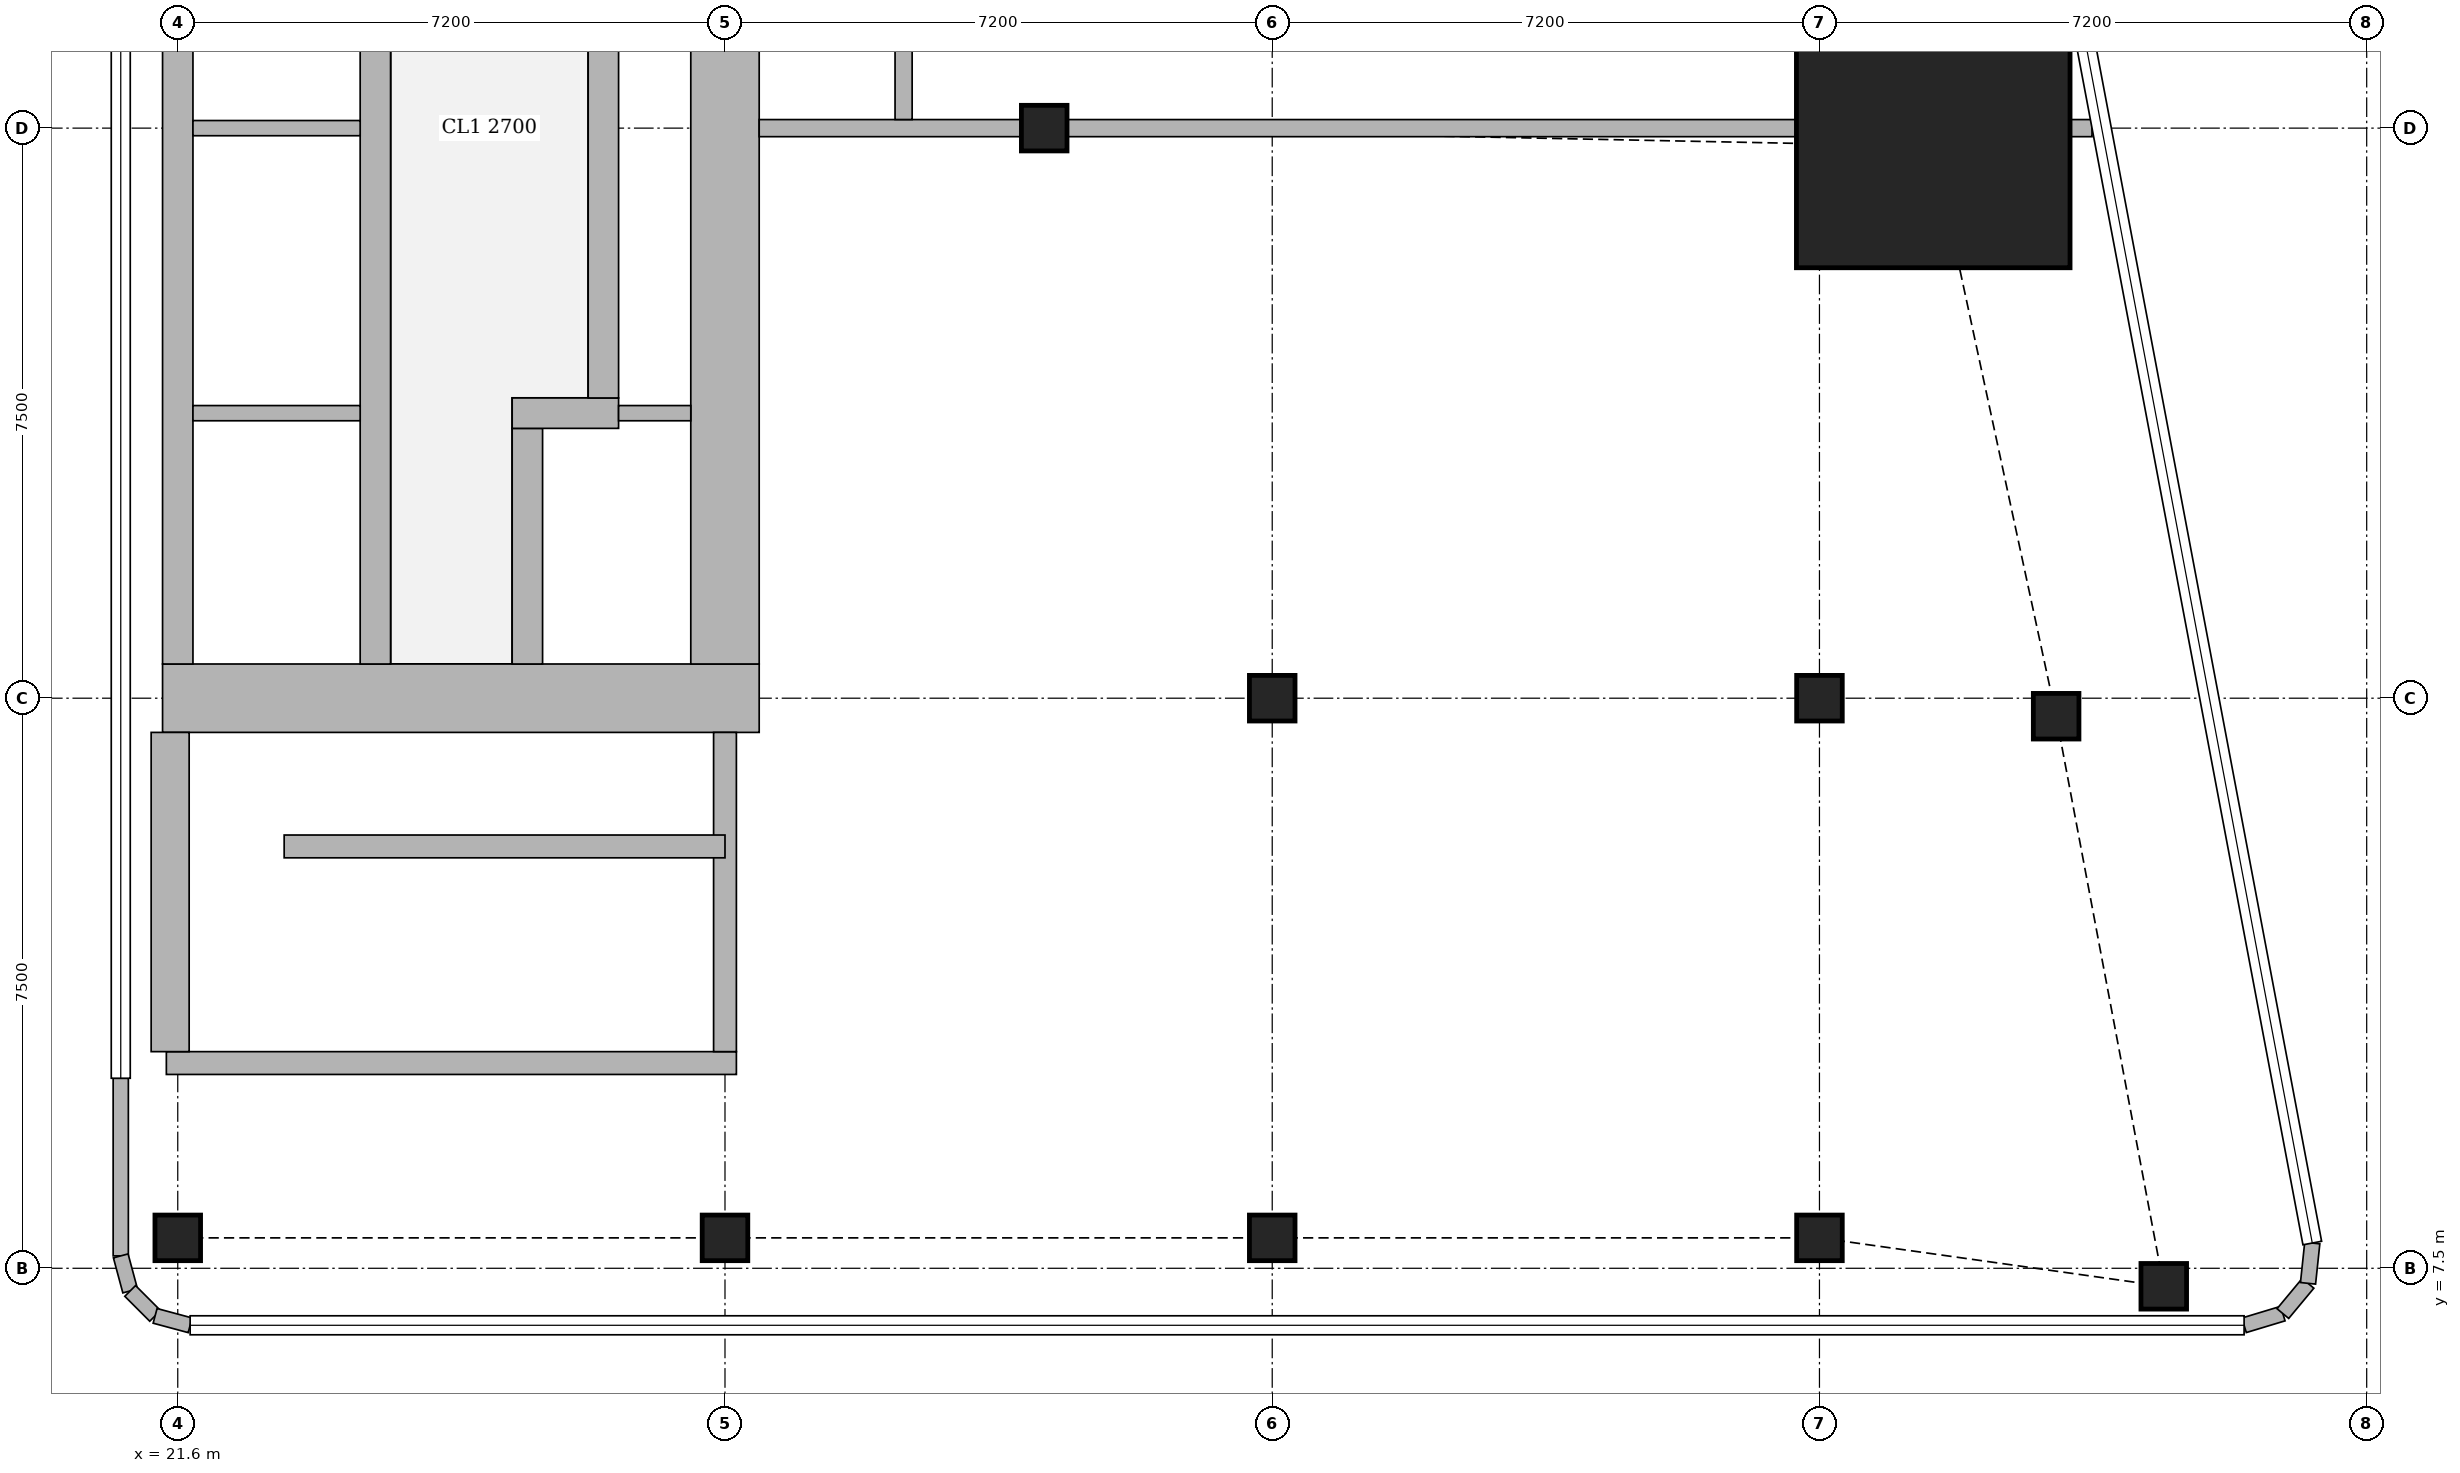
"""IFC4 building model, lengths in metres.
Left out: names, types, materials, properties, quantities, classifications, styles, units other than length and angle.
Written with IfcOpenShell. Run it as: python <this file> out.ifc"""

import sys

from ifc_helpers import new_model, si_unit, direction, frame, frame_2d, origin, origin_2d, place, context, subcontext, project, spatial, rectangle, extrude, element, fill, save


model = new_model("IFC4")
c1 = context("Model", 3, precision=1e-05, world=origin(), true_north=direction((0.0, 1.0)))
c2 = subcontext(c1, "Body", "Model", "MODEL_VIEW")
j1 = project(units=[si_unit("LENGTHUNIT", "METRE"), si_unit("PLANEANGLEUNIT", "RADIAN")], contexts=[c1])
p1 = place(None, origin())
s1 = spatial("IfcSite", under=j1, at=p1, CompositionType="ELEMENT")
p2 = place(p1, origin())
s2 = spatial("IfcBuilding", under=s1, at=p2, CompositionType="ELEMENT")
p3 = place(p2, frame((0.0, 0.0, 296.6)))
s3 = spatial("IfcBuildingStorey", under=s2, at=p3, CompositionType="ELEMENT", Elevation=296.6)
for number, where, z_axis, x_axis in (
    (1, (21.6, 7.9, 0.0), (0.0, 0.0, 1.0), (1.0, 0.0, 0.0)),
    (2, (28.8, 7.9, 0.0), (0.0, 0.0, 1.0), (1.0, 0.0, 0.0)),
    (3, (36.0, 7.9, 0.0), (0.0, 0.0, 1.0), (1.0, 0.0, 0.0)),
    (4, (43.2, 7.9, 0.0), (0.0, 0.0, 1.0), (1.0, 0.0, 0.0)),
    (5, (47.73, 7.263, 0.0), (0.0, 0.0, 1.0), (1.0, 0.0, 0.0)),
    (6, (36.0, 15.0, 0.0), (0.0, 0.0, 1.0), (1.0, 0.0, 0.0)),
    (7, (43.2, 15.0, 0.0), (0.0, 0.0, 1.0), (1.0, 0.0, 0.0)),
    (8, (46.314, 14.763, 0.0), (0.0, 0.0, 1.0), (1.0, 0.0, 0.0)),
    (9, (33.0, 22.5, 0.0), (0.0, 0.0, 1.0), (1.0, 0.0, 0.0)),
):
    element("IfcColumn", number, at=place(p3, frame(where, z_axis=z_axis, x_axis=x_axis)), inside=s3, PredefinedType="COLUMN", context=c2, shape_type="SweptSolid", body=[
        extrude(rectangle(XDim=0.6, YDim=0.6, at=origin_2d()), origin(), (0.0, 0.0, 1.0), 5.0),
    ])
p4 = place(p3, frame((44.697, 22.263, 0.0), z_axis=(0.0, 0.0, 1.0), x_axis=(1.0, 0.0, 0.0)))
e10 = element("IfcColumn", 10, at=p4, inside=s3, PredefinedType="COLUMN", context=c2, shape_type="SweptSolid", body=[
    extrude(rectangle(XDim=3.6, YDim=3.2, at=origin_2d()), origin(), (0.0, 0.0, 1.0), 5.0),
])
p5 = place(p3, frame((21.4, 15.0, 0.0), z_axis=(0.0, 0.0, 1.0), x_axis=(1.0, 0.0, 0.0)))
e11 = element("IfcWall", 11, at=p5, inside=s3, PredefinedType="SHEAR", context=c2, shape_type="SweptSolid", body=[
    extrude(rectangle(XDim=7.85, YDim=0.9, at=frame_2d((3.925, 0.0))), origin(), (0.0, 0.0, 1.0), 5.0),
])
p6 = place(p5, frame((3.25, 0.0, 0.0)))
e12 = element("IfcOpeningElement", 12, at=p6, cuts=e11, PredefinedType="OPENING", context=c2, shape_type="SweptSolid", body=[
    extrude(rectangle(XDim=1.1, YDim=2.1, at=frame_2d((0.55, 1.05))), frame((0.0, 0.46, 0.0), z_axis=(0.0, -1.0, 0.0), x_axis=(1.0, 0.0, 0.0)), (0.0, 0.0, 1.0), 0.92),
])
p7 = place(p3, frame((28.8, 15.45, 0.0), z_axis=(0.0, 0.0, 1.0), x_axis=(0.0, 1.0, 0.0)))
e13 = element("IfcWall", 13, at=p7, inside=s3, PredefinedType="SHEAR", context=c2, shape_type="SweptSolid", body=[
    extrude(rectangle(XDim=14.1, YDim=0.9, at=frame_2d((7.05, 0.0))), origin(), (0.0, 0.0, 1.0), 5.0),
])
for number, where, z_axis, x_axis in (
    (14, (21.6, 15.45, 0.0), (0.0, 0.0, 1.0), (0.0, 1.0, 0.0)),
    (15, (24.2, 15.45, 0.0), (0.0, 0.0, 1.0), (0.0, 1.0, 0.0)),
):
    element("IfcWall", number, at=place(p3, frame(where, z_axis=z_axis, x_axis=x_axis)), inside=s3, PredefinedType="SHEAR", context=c2, shape_type="SweptSolid", body=[
        extrude(rectangle(XDim=14.1, YDim=0.4, at=frame_2d((7.05, 0.0))), origin(), (0.0, 0.0, 1.0), 5.0),
    ])
p8 = place(p3, frame((26.2, 15.45, 0.0), z_axis=(0.0, 0.0, 1.0), x_axis=(0.0, 1.0, 0.0)))
e16 = element("IfcWall", 16, at=p8, inside=s3, PredefinedType="SHEAR", context=c2, shape_type="SweptSolid", body=[
    extrude(rectangle(XDim=3.1, YDim=0.4, at=frame_2d((1.55, 0.0))), origin(), (0.0, 0.0, 1.0), 5.0),
])
p9 = place(p8, frame((0.825, 0.0, 0.0)))
e17 = element("IfcOpeningElement", 17, at=p9, cuts=e16, PredefinedType="OPENING", context=c2, shape_type="SweptSolid", body=[
    extrude(rectangle(XDim=1.2, YDim=2.1, at=frame_2d((0.6, 1.05))), frame((0.0, 0.21, 0.0), z_axis=(0.0, -1.0, 0.0), x_axis=(1.0, 0.0, 0.0)), (0.0, 0.0, 1.0), 0.42),
])
p10 = place(p3, frame((26.0, 18.75, 0.0), z_axis=(0.0, 0.0, 1.0), x_axis=(1.0, 0.0, 0.0)))
e18 = element("IfcWall", 18, at=p10, inside=s3, PredefinedType="SHEAR", context=c2, shape_type="SweptSolid", body=[
    extrude(rectangle(XDim=1.4, YDim=0.4, at=frame_2d((0.7, 0.0))), origin(), (0.0, 0.0, 1.0), 5.0),
])
p11 = place(p3, frame((27.2, 18.95, 0.0), z_axis=(0.0, 0.0, 1.0), x_axis=(0.0, 1.0, 0.0)))
e19 = element("IfcWall", 19, at=p11, inside=s3, PredefinedType="SHEAR", context=c2, shape_type="SweptSolid", body=[
    extrude(rectangle(XDim=7.1, YDim=0.4, at=frame_2d((3.55, 0.0))), origin(), (0.0, 0.0, 1.0), 5.0),
])
p12 = place(p3, frame((21.45, 10.2, 0.0), z_axis=(0.0, 0.0, 1.0), x_axis=(1.0, 0.0, 0.0)))
e20 = element("IfcWall", 20, at=p12, inside=s3, PredefinedType="SHEAR", context=c2, shape_type="SweptSolid", body=[
    extrude(rectangle(XDim=7.5, YDim=0.3, at=frame_2d((3.75, 0.0))), origin(), (0.0, 0.0, 1.0), 5.0),
])
p13 = place(p12, frame((0.5, 0.0, 0.0)))
e21 = element("IfcOpeningElement", 21, at=p13, cuts=e20, PredefinedType="OPENING", context=c2, shape_type="SweptSolid", body=[
    extrude(rectangle(XDim=1.1, YDim=2.1, at=frame_2d((0.55, 1.05))), frame((0.0, 0.16, 0.0), z_axis=(0.0, -1.0, 0.0), x_axis=(1.0, 0.0, 0.0)), (0.0, 0.0, 1.0), 0.32),
])
p14 = place(p3, frame((21.5, 10.35, 0.0), z_axis=(0.0, 0.0, 1.0), x_axis=(0.0, 1.0, 0.0)))
e22 = element("IfcWall", 22, at=p14, inside=s3, PredefinedType="SHEAR", context=c2, shape_type="SweptSolid", body=[
    extrude(rectangle(XDim=4.2, YDim=0.5, at=frame_2d((2.1, 0.0))), origin(), (0.0, 0.0, 1.0), 5.0),
])
p15 = place(p3, frame((28.8, 10.35, 0.0), z_axis=(0.0, 0.0, 1.0), x_axis=(0.0, 1.0, 0.0)))
e23 = element("IfcWall", 23, at=p15, inside=s3, PredefinedType="SHEAR", context=c2, shape_type="SweptSolid", body=[
    extrude(rectangle(XDim=4.2, YDim=0.3, at=frame_2d((2.1, 0.0))), origin(), (0.0, 0.0, 1.0), 5.0),
])
p16 = place(p3, frame((48.787, 6.75, 0.0), z_axis=(0.0, 0.0, 1.0), x_axis=(0.957282247819, 0.289155145225, 0.0)))
e24 = element("IfcWall", 24, at=p16, inside=s3, PredefinedType="SOLIDWALL", context=c2, shape_type="SweptSolid", body=[
    extrude(rectangle(XDim=0.533, YDim=0.2, at=frame_2d((0.266, 0.0))), origin(), (0.0, 0.0, 1.0), 4.65),
])
p17 = place(p3, frame((49.297, 6.904, 0.0), z_axis=(0.0, 0.0, 1.0), x_axis=(0.639255849474, 0.768994121508, 0.0)))
e25 = element("IfcWall", 25, at=p17, inside=s3, PredefinedType="SOLIDWALL", context=c2, shape_type="SweptSolid", body=[
    extrude(rectangle(XDim=0.518, YDim=0.2, at=frame_2d((0.259, 0.0))), origin(), (0.0, 0.0, 1.0), 4.65),
])
p18 = place(p3, frame((49.628, 7.302, 0.0), z_axis=(0.0, 0.0, 1.0), x_axis=(0.105352390132, 0.994434952068, 0.0)))
e26 = element("IfcWall", 26, at=p18, inside=s3, PredefinedType="SOLIDWALL", context=c2, shape_type="SweptSolid", body=[
    extrude(rectangle(XDim=0.533, YDim=0.2, at=frame_2d((0.267, 0.0))), origin(), (0.0, 0.0, 1.0), 4.65),
])
p19 = place(p3, frame((20.85, 10.0, 0.0), z_axis=(0.0, 0.0, 1.0), x_axis=(0.0, -1.0, 0.0)))
e27 = element("IfcWall", 27, at=p19, inside=s3, PredefinedType="SOLIDWALL", context=c2, shape_type="SweptSolid", body=[
    extrude(rectangle(XDim=2.337, YDim=0.2, at=frame_2d((1.168, 0.0))), origin(), (0.0, 0.0, 1.0), 4.65),
])
p20 = place(p19, frame((0.5, 0.0, 0.0)))
e28 = element("IfcOpeningElement", 28, at=p20, cuts=e27, PredefinedType="OPENING", context=c2, shape_type="SweptSolid", body=[
    extrude(rectangle(XDim=1.0, YDim=2.4, at=frame_2d((0.5, 1.2))), frame((0.0, 0.11, 0.0), z_axis=(0.0, -1.0, 0.0), x_axis=(1.0, 0.0, 0.0)), (0.0, 0.0, 1.0), 0.22),
])
p21 = place(p3, frame((20.85, 7.663, 0.0), z_axis=(0.0, 0.0, 1.0), x_axis=(0.259698463175, -0.965689757751, 0.0)))
e29 = element("IfcWall", 29, at=p21, inside=s3, PredefinedType="SOLIDWALL", context=c2, shape_type="SweptSolid", body=[
    extrude(rectangle(XDim=0.478, YDim=0.2, at=frame_2d((0.239, 0.0))), origin(), (0.0, 0.0, 1.0), 4.65),
])
p22 = place(p3, frame((20.974, 7.202, 0.0), z_axis=(0.0, 0.0, 1.0), x_axis=(0.707106781187, -0.707106781187, 0.0)))
e30 = element("IfcWall", 30, at=p22, inside=s3, PredefinedType="SOLIDWALL", context=c2, shape_type="SweptSolid", body=[
    extrude(rectangle(XDim=0.464, YDim=0.2, at=frame_2d((0.232, 0.0))), origin(), (0.0, 0.0, 1.0), 4.65),
])
p23 = place(p3, frame((21.302, 6.874, 0.0), z_axis=(0.0, 0.0, 1.0), x_axis=(0.965655254015, -0.259826731483, 0.0)))
e31 = element("IfcWall", 31, at=p23, inside=s3, PredefinedType="SOLIDWALL", context=c2, shape_type="SweptSolid", body=[
    extrude(rectangle(XDim=0.477, YDim=0.2, at=frame_2d((0.239, 0.0))), origin(), (0.0, 0.0, 1.0), 4.65),
])
p24 = place(p3, frame((29.25, 22.5, 0.0), z_axis=(0.0, 0.0, 1.0), x_axis=(1.0, 0.0, 0.0)))
e32 = element("IfcWall", 32, at=p24, inside=s3, PredefinedType="SOLIDWALL", context=c2, shape_type="SweptSolid", body=[
    extrude(rectangle(XDim=3.449, YDim=0.225, at=frame_2d((1.725, 0.0))), origin(), (0.0, 0.0, 1.0), 4.65),
])
p25 = place(p24, origin())
e33 = element("IfcOpeningElement", 33, at=p25, cuts=e32, PredefinedType="OPENING", context=c2, shape_type="SweptSolid", body=[
    extrude(rectangle(XDim=1.8, YDim=2.4, at=frame_2d((0.9, 1.2))), frame((0.0, 0.123, 0.0), z_axis=(0.0, -1.0, 0.0), x_axis=(1.0, 0.0, 0.0)), (0.0, 0.0, 1.0), 0.245),
])
p26 = place(p3, frame((33.301, 22.5, 0.0), z_axis=(0.0, 0.0, 1.0), x_axis=(1.0, 0.0, 0.0)))
e34 = element("IfcWall", 34, at=p26, inside=s3, PredefinedType="SOLIDWALL", context=c2, shape_type="SweptSolid", body=[
    extrude(rectangle(XDim=9.595, YDim=0.225, at=frame_2d((4.797, 0.0))), origin(), (0.0, 0.0, 1.0), 3.65),
])
p27 = place(p3, frame((46.498, 22.5, 0.0), z_axis=(0.0, 0.0, 1.0), x_axis=(1.0, 0.0, 0.0)))
e35 = element("IfcWall", 35, at=p27, inside=s3, PredefinedType="SOLIDWALL", context=c2, shape_type="SweptSolid", body=[
    extrude(rectangle(XDim=0.288, YDim=0.225, at=frame_2d((0.144, 0.0))), origin(), (0.0, 0.0, 1.0), 4.65),
])
p28 = place(p3, frame((31.15, 22.613, 0.0), z_axis=(0.0, 0.0, 1.0), x_axis=(0.0, 1.0, 0.0)))
e36 = element("IfcWall", 36, at=p28, inside=s3, PredefinedType="SOLIDWALL", context=c2, shape_type="SweptSolid", body=[
    extrude(rectangle(XDim=14.237, YDim=0.225, at=frame_2d((7.119, 0.0))), origin(), (0.0, 0.0, 1.0), 4.65),
])
p29 = place(p28, frame((3.987, 0.0, 0.0)))
e37 = element("IfcOpeningElement", 37, at=p29, cuts=e36, PredefinedType="OPENING", context=c2, shape_type="SweptSolid", body=[
    extrude(rectangle(XDim=1.8, YDim=2.4, at=frame_2d((0.9, 1.2))), frame((0.0, 0.123, 0.0), z_axis=(0.0, -1.0, 0.0), x_axis=(1.0, 0.0, 0.0)), (0.0, 0.0, 1.0), 0.245),
])
p30 = place(p3, frame((23.0, 13.05, 0.0), z_axis=(0.0, 0.0, 1.0), x_axis=(1.0, 0.0, 0.0)))
e38 = element("IfcWall", 38, at=p30, inside=s3, PredefinedType="SHEAR", context=c2, shape_type="SweptSolid", body=[
    extrude(rectangle(XDim=5.8, YDim=0.3, at=frame_2d((2.9, 0.0))), origin(), (0.0, 0.0, 1.0), 5.0),
])
for number, where, z_axis, x_axis in (
    (39, (21.8, 18.75, 0.0), (0.0, 0.0, 1.0), (1.0, 0.0, 0.0)),
    (40, (21.8, 22.5, 0.0), (0.0, 0.0, 1.0), (1.0, 0.0, 0.0)),
):
    element("IfcWall", number, at=place(p3, frame(where, z_axis=z_axis, x_axis=x_axis)), inside=s3, PredefinedType="SOLIDWALL", context=c2, shape_type="SweptSolid", body=[
        extrude(rectangle(XDim=2.2, YDim=0.2, at=frame_2d((1.1, 0.0))), origin(), (0.0, 0.0, 1.0), 4.65),
    ])
p31 = place(p3, frame((27.4, 18.75, 0.0), z_axis=(0.0, 0.0, 1.0), x_axis=(1.0, 0.0, 0.0)))
e41 = element("IfcWall", 41, at=p31, inside=s3, PredefinedType="SOLIDWALL", context=c2, shape_type="SweptSolid", body=[
    extrude(rectangle(XDim=0.95, YDim=0.2, at=frame_2d((0.475, 0.0))), origin(), (0.0, 0.0, 1.0), 4.65),
])
p32 = place(p20, origin())
e42 = element("IfcDoor", 42, at=p32, inside=s3, OperationType="SINGLE_SWING_RIGHT", PredefinedType="DOOR", context=c2, shape_type="SweptSolid", body=[
    extrude(rectangle(XDim=1.0, YDim=2.4, at=frame_2d((0.5, 1.2))), frame((0.0, 0.025, 0.0), z_axis=(0.0, -1.0, 0.0), x_axis=(1.0, 0.0, 0.0)), (0.0, 0.0, 1.0), 0.05),
])
fill(e28, e42)
p33 = place(p25, origin())
e43 = element("IfcDoor", 43, at=p33, inside=s3, OperationType="DOUBLE_DOOR_SINGLE_SWING", PredefinedType="DOOR", context=c2, shape_type="SweptSolid", body=[
    extrude(rectangle(XDim=1.8, YDim=2.4, at=frame_2d((0.9, 1.2))), frame((0.0, 0.025, 0.0), z_axis=(0.0, -1.0, 0.0), x_axis=(1.0, 0.0, 0.0)), (0.0, 0.0, 1.0), 0.05),
])
fill(e33, e43)
p34 = place(p6, origin())
e44 = element("IfcDoor", 44, at=p34, inside=s3, OperationType="SINGLE_SWING_RIGHT", PredefinedType="DOOR", context=c2, shape_type="SweptSolid", body=[
    extrude(rectangle(XDim=1.1, YDim=2.1, at=frame_2d((0.55, 1.05))), frame((0.0, 0.025, 0.0), z_axis=(0.0, -1.0, 0.0), x_axis=(1.0, 0.0, 0.0)), (0.0, 0.0, 1.0), 0.05),
])
fill(e12, e44)
p35 = place(p9, origin())
e45 = element("IfcDoor", 45, at=p35, inside=s3, OperationType="DOUBLE_DOOR_SLIDING", PredefinedType="DOOR", context=c2, shape_type="SweptSolid", body=[
    extrude(rectangle(XDim=1.2, YDim=2.1, at=frame_2d((0.6, 1.05))), frame((0.0, 0.025, 0.0), z_axis=(0.0, -1.0, 0.0), x_axis=(1.0, 0.0, 0.0)), (0.0, 0.0, 1.0), 0.05),
])
fill(e17, e45)
p36 = place(p13, origin())
e46 = element("IfcDoor", 46, at=p36, inside=s3, OperationType="SINGLE_SWING_LEFT", PredefinedType="DOOR", context=c2, shape_type="SweptSolid", body=[
    extrude(rectangle(XDim=1.1, YDim=2.1, at=frame_2d((0.55, 1.05))), frame((0.0, 0.025, 0.0), z_axis=(0.0, -1.0, 0.0), x_axis=(1.0, 0.0, 0.0)), (0.0, 0.0, 1.0), 0.05),
])
fill(e21, e46)
save(model, sys.argv[1])
